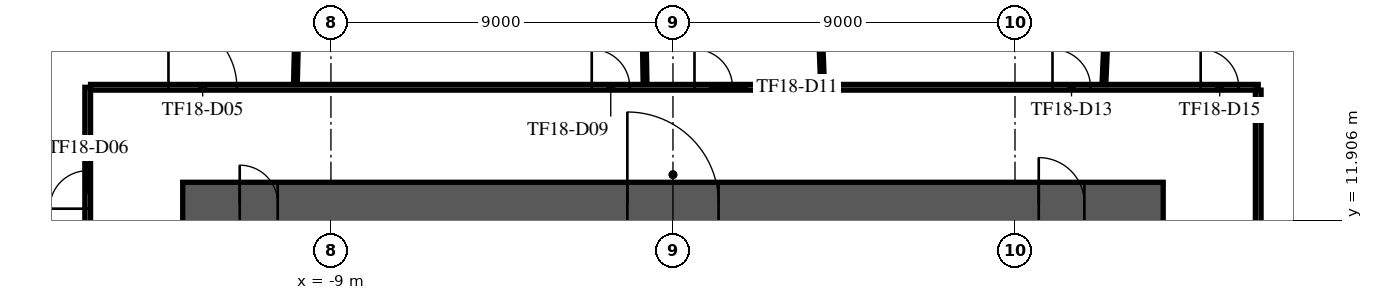
"""IFC4 building model, lengths in metres.
Left out: names, types, materials, properties, quantities, classifications, styles, units other than length and angle.
Written with IfcOpenShell. Run it as: python <this file> out.ifc"""

import sys

from ifc_helpers import new_model, si_unit, direction, frame, frame_2d, origin, place, context, subcontext, project, spatial, rectangle, extrude, element, fill, save


model = new_model("IFC4")
c1 = context("Model", 3, precision=1e-05, world=origin(), true_north=direction((0.0, 1.0)))
c2 = subcontext(c1, "Body", "Model", "MODEL_VIEW")
j1 = project(units=[si_unit("LENGTHUNIT", "METRE"), si_unit("PLANEANGLEUNIT", "RADIAN")], contexts=[c1])
p1 = place(None, origin())
s1 = spatial("IfcSite", under=j1, at=p1, CompositionType="ELEMENT")
p2 = place(p1, origin())
s2 = spatial("IfcBuilding", under=s1, at=p2, CompositionType="ELEMENT")
p3 = place(p2, frame((0.0, 0.0, 86.1)))
s3 = spatial("IfcBuildingStorey", under=s2, at=p3, CompositionType="ELEMENT", Elevation=86.1)
p4 = place(p3, frame((-12.9, 12.35, 0.0), z_axis=(0.0, 0.0, 1.0), x_axis=(1.0, 0.0, 0.0)))
e1 = element("IfcWall", 1, at=p4, inside=s3, PredefinedType="SHEAR", context=c2, shape_type="SweptSolid", body=[
    extrude(rectangle(XDim=25.8, YDim=1.1, at=frame_2d((12.9, 0.0))), origin(), (0.0, 0.0, 1.0), 3.58),
])
p5 = place(p4, frame((11.7, 0.0, 0.0)))
e2 = element("IfcOpeningElement", 2, at=p5, cuts=e1, PredefinedType="OPENING", context=c2, shape_type="SweptSolid", body=[
    extrude(rectangle(XDim=2.4, YDim=2.4, at=frame_2d((1.2, 1.2))), frame((0.0, 0.56, 0.0), z_axis=(0.0, -1.0, 0.0), x_axis=(1.0, 0.0, 0.0)), (0.0, 0.0, 1.0), 1.12),
])
p6 = place(p4, frame((22.525, 0.0, 0.0)))
e3 = element("IfcOpeningElement", 3, at=p6, cuts=e1, PredefinedType="OPENING", context=c2, shape_type="SweptSolid", body=[
    extrude(rectangle(XDim=1.2, YDim=2.1, at=frame_2d((0.6, 1.05))), frame((0.0, 0.56, 0.0), z_axis=(0.0, -1.0, 0.0), x_axis=(1.0, 0.0, 0.0)), (0.0, 0.0, 1.0), 1.12),
])
p7 = place(p4, frame((1.5, 0.0, 0.0)))
e4 = element("IfcOpeningElement", 4, at=p7, cuts=e1, PredefinedType="OPENING", context=c2, shape_type="SweptSolid", body=[
    extrude(rectangle(XDim=1.0, YDim=2.1, at=frame_2d((0.5, 1.05))), frame((0.0, 0.56, 0.0), z_axis=(0.0, -1.0, 0.0), x_axis=(1.0, 0.0, 0.0)), (0.0, 0.0, 1.0), 1.12),
])
p8 = place(p3, frame((-15.4, -15.4, 0.0), z_axis=(0.0, 0.0, 1.0), x_axis=(0.0, 1.0, 0.0)))
e5 = element("IfcWall", 5, at=p8, inside=s3, PredefinedType="PARTITIONING", context=c2, shape_type="SweptSolid", body=[
    extrude(rectangle(XDim=30.8, YDim=0.15, at=frame_2d((15.4, 0.0))), origin(), (0.0, 0.0, 1.0), 3.08),
])
p9 = place(p8, frame((21.677, 0.0, 0.0)))
e6 = element("IfcOpeningElement", 6, at=p9, cuts=e5, PredefinedType="OPENING", context=c2, shape_type="SweptSolid", body=[
    extrude(rectangle(XDim=1.8, YDim=2.1, at=frame_2d((0.9, 1.05))), frame((0.0, 0.085, 0.0), z_axis=(0.0, -1.0, 0.0), x_axis=(1.0, 0.0, 0.0)), (0.0, 0.0, 1.0), 0.17),
])
p10 = place(p8, frame((17.927, 0.0, 0.0)))
e7 = element("IfcOpeningElement", 7, at=p10, cuts=e5, PredefinedType="OPENING", context=c2, shape_type="SweptSolid", body=[
    extrude(rectangle(XDim=1.0, YDim=2.1, at=frame_2d((0.5, 1.05))), frame((0.0, 0.085, 0.0), z_axis=(0.0, -1.0, 0.0), x_axis=(1.0, 0.0, 0.0)), (0.0, 0.0, 1.0), 0.17),
])
p11 = place(p8, frame((15.322, 0.0, 0.0)))
e8 = element("IfcOpeningElement", 8, at=p11, cuts=e5, PredefinedType="OPENING", context=c2, shape_type="SweptSolid", body=[
    extrude(rectangle(XDim=1.0, YDim=2.1, at=frame_2d((0.5, 1.05))), frame((0.0, 0.085, 0.0), z_axis=(0.0, -1.0, 0.0), x_axis=(1.0, 0.0, 0.0)), (0.0, 0.0, 1.0), 0.17),
])
p12 = place(p8, frame((6.348, 0.0, 0.0)))
e9 = element("IfcOpeningElement", 9, at=p12, cuts=e5, PredefinedType="OPENING", context=c2, shape_type="SweptSolid", body=[
    extrude(rectangle(XDim=1.0, YDim=2.1, at=frame_2d((0.5, 1.05))), frame((0.0, 0.085, 0.0), z_axis=(0.0, -1.0, 0.0), x_axis=(1.0, 0.0, 0.0)), (0.0, 0.0, 1.0), 0.17),
])
p13 = place(p8, frame((27.605, 0.0, 0.0)))
e10 = element("IfcOpeningElement", 10, at=p13, cuts=e5, PredefinedType="OPENING", context=c2, shape_type="SweptSolid", body=[
    extrude(rectangle(XDim=1.0, YDim=2.1, at=frame_2d((0.5, 1.05))), frame((0.0, 0.085, 0.0), z_axis=(0.0, -1.0, 0.0), x_axis=(1.0, 0.0, 0.0)), (0.0, 0.0, 1.0), 0.17),
])
p14 = place(p8, frame((2.8, 0.0, 0.0)))
e11 = element("IfcOpeningElement", 11, at=p14, cuts=e5, PredefinedType="OPENING", context=c2, shape_type="SweptSolid", body=[
    extrude(rectangle(XDim=1.0, YDim=2.1, at=frame_2d((0.5, 1.05))), frame((0.0, 0.085, 0.0), z_axis=(0.0, -1.0, 0.0), x_axis=(1.0, 0.0, 0.0)), (0.0, 0.0, 1.0), 0.17),
])
p15 = place(p3, frame((-15.325, 15.4, 0.0), z_axis=(0.0, 0.0, 1.0), x_axis=(1.0, 0.0, 0.0)))
e12 = element("IfcWall", 12, at=p15, inside=s3, PredefinedType="PARTITIONING", context=c2, shape_type="SweptSolid", body=[
    extrude(rectangle(XDim=30.725, YDim=0.15, at=frame_2d((15.362, 0.0))), origin(), (0.0, 0.0, 1.0), 3.08),
])
p16 = place(p15, frame((2.05, 0.0, 0.0)))
e13 = element("IfcOpeningElement", 13, at=p16, cuts=e12, PredefinedType="OPENING", context=c2, shape_type="SweptSolid", body=[
    extrude(rectangle(XDim=1.8, YDim=2.1, at=frame_2d((0.9, 1.05))), frame((0.0, 0.085, 0.0), z_axis=(0.0, -1.0, 0.0), x_axis=(1.0, 0.0, 0.0)), (0.0, 0.0, 1.0), 0.17),
])
p17 = place(p15, frame((13.188, 0.0, 0.0)))
e14 = element("IfcOpeningElement", 14, at=p17, cuts=e12, PredefinedType="OPENING", context=c2, shape_type="SweptSolid", body=[
    extrude(rectangle(XDim=1.0, YDim=2.1, at=frame_2d((0.5, 1.05))), frame((0.0, 0.085, 0.0), z_axis=(0.0, -1.0, 0.0), x_axis=(1.0, 0.0, 0.0)), (0.0, 0.0, 1.0), 0.17),
])
p18 = place(p15, frame((15.892, 0.0, 0.0)))
e15 = element("IfcOpeningElement", 15, at=p18, cuts=e12, PredefinedType="OPENING", context=c2, shape_type="SweptSolid", body=[
    extrude(rectangle(XDim=1.0, YDim=2.1, at=frame_2d((0.5, 1.05))), frame((0.0, 0.085, 0.0), z_axis=(0.0, -1.0, 0.0), x_axis=(1.0, 0.0, 0.0)), (0.0, 0.0, 1.0), 0.17),
])
p19 = place(p15, frame((25.312, 0.0, 0.0)))
e16 = element("IfcOpeningElement", 16, at=p19, cuts=e12, PredefinedType="OPENING", context=c2, shape_type="SweptSolid", body=[
    extrude(rectangle(XDim=1.0, YDim=2.1, at=frame_2d((0.5, 1.05))), frame((0.0, 0.085, 0.0), z_axis=(0.0, -1.0, 0.0), x_axis=(1.0, 0.0, 0.0)), (0.0, 0.0, 1.0), 0.17),
])
p20 = place(p15, frame((29.211, 0.0, 0.0)))
e17 = element("IfcOpeningElement", 17, at=p20, cuts=e12, PredefinedType="OPENING", context=c2, shape_type="SweptSolid", body=[
    extrude(rectangle(XDim=1.0, YDim=2.1, at=frame_2d((0.5, 1.05))), frame((0.0, 0.085, 0.0), z_axis=(0.0, -1.0, 0.0), x_axis=(1.0, 0.0, 0.0)), (0.0, 0.0, 1.0), 0.17),
])
p21 = place(p3, frame((15.4, -15.325, 0.0), z_axis=(0.0, 0.0, 1.0), x_axis=(0.0, 1.0, 0.0)))
e18 = element("IfcWall", 18, at=p21, inside=s3, PredefinedType="PARTITIONING", context=c2, shape_type="SweptSolid", body=[
    extrude(rectangle(XDim=30.65, YDim=0.15, at=frame_2d((15.325, 0.0))), origin(), (0.0, 0.0, 1.0), 3.08),
])
p22 = place(p21, frame((24.14, 0.0, 0.0)))
e19 = element("IfcOpeningElement", 19, at=p22, cuts=e18, PredefinedType="OPENING", context=c2, shape_type="SweptSolid", body=[
    extrude(rectangle(XDim=1.8, YDim=2.1, at=frame_2d((0.9, 1.05))), frame((0.0, 0.085, 0.0), z_axis=(0.0, -1.0, 0.0), x_axis=(1.0, 0.0, 0.0)), (0.0, 0.0, 1.0), 0.17),
])
p23 = place(p21, frame((3.3, 0.0, 0.0)))
e20 = element("IfcOpeningElement", 20, at=p23, cuts=e18, PredefinedType="OPENING", context=c2, shape_type="SweptSolid", body=[
    extrude(rectangle(XDim=1.8, YDim=2.1, at=frame_2d((0.9, 1.05))), frame((0.0, 0.085, 0.0), z_axis=(0.0, -1.0, 0.0), x_axis=(1.0, 0.0, 0.0)), (0.0, 0.0, 1.0), 0.17),
])
p24 = place(p21, frame((19.191, 0.0, 0.0)))
e21 = element("IfcOpeningElement", 21, at=p24, cuts=e18, PredefinedType="OPENING", context=c2, shape_type="SweptSolid", body=[
    extrude(rectangle(XDim=1.0, YDim=2.1, at=frame_2d((0.5, 1.05))), frame((0.0, 0.085, 0.0), z_axis=(0.0, -1.0, 0.0), x_axis=(1.0, 0.0, 0.0)), (0.0, 0.0, 1.0), 0.17),
])
p25 = place(p21, frame((10.963, 0.0, 0.0)))
e22 = element("IfcOpeningElement", 22, at=p25, cuts=e18, PredefinedType="OPENING", context=c2, shape_type="SweptSolid", body=[
    extrude(rectangle(XDim=1.0, YDim=2.1, at=frame_2d((0.5, 1.05))), frame((0.0, 0.085, 0.0), z_axis=(0.0, -1.0, 0.0), x_axis=(1.0, 0.0, 0.0)), (0.0, 0.0, 1.0), 0.17),
])
p26 = place(p3, frame((-9.935, 15.476, 0.0), z_axis=(0.0, 0.0, 1.0), x_axis=(0.024996463825, 0.999687539582, 0.0)))
e23 = element("IfcWall", 23, at=p26, inside=s3, PredefinedType="PARTITIONING", context=c2, shape_type="SweptSolid", body=[
    extrude(rectangle(XDim=8.566, YDim=0.1, at=frame_2d((4.283, 0.0))), origin(), (0.0, 0.0, 1.0), 3.58),
])
p27 = place(p3, frame((-0.958, 28.108, 0.0), z_axis=(0.0, 0.0, 1.0), x_axis=(0.017700788333, -0.999843328773, 0.0)))
e24 = element("IfcWall", 24, at=p27, inside=s3, PredefinedType="PARTITIONING", context=c2, shape_type="SweptSolid", body=[
    extrude(rectangle(XDim=12.634, YDim=0.1, at=frame_2d((6.317, 0.0))), origin(), (0.0, 0.0, 1.0), 3.58),
])
p28 = place(p3, frame((3.448, 28.089, 0.0), z_axis=(0.0, 0.0, 1.0), x_axis=(0.038608436219, -0.999254416379, 0.0)))
e25 = element("IfcWall", 25, at=p28, inside=s3, PredefinedType="PARTITIONING", context=c2, shape_type="SweptSolid", body=[
    extrude(rectangle(XDim=12.622, YDim=0.1, at=frame_2d((6.311, 0.0))), origin(), (0.0, 0.0, 1.0), 2.96),
])
p29 = place(p3, frame((11.339, 15.477, 0.0), z_axis=(0.0, 0.0, 1.0), x_axis=(0.04370366829, 0.999044538235, 0.0)))
e26 = element("IfcWall", 26, at=p29, inside=s3, PredefinedType="PARTITIONING", context=c2, shape_type="SweptSolid", body=[
    extrude(rectangle(XDim=11.452, YDim=0.1, at=frame_2d((5.726, 0.0))), origin(), (0.0, 0.0, 1.0), 3.58),
])
p30 = place(p5, origin())
e27 = element("IfcDoor", 27, at=p30, inside=s3, OperationType="SINGLE_SWING_LEFT", PredefinedType="DOOR", context=c2, shape_type="SweptSolid", body=[
    extrude(rectangle(XDim=2.4, YDim=2.4, at=frame_2d((1.2, 1.2))), frame((0.0, 0.025, 0.0), z_axis=(0.0, -1.0, 0.0), x_axis=(1.0, 0.0, 0.0)), (0.0, 0.0, 1.0), 0.05),
])
fill(e2, e27)
p31 = place(p6, origin())
e28 = element("IfcDoor", 28, at=p31, inside=s3, OperationType="SINGLE_SWING_LEFT", PredefinedType="DOOR", context=c2, shape_type="SweptSolid", body=[
    extrude(rectangle(XDim=1.2, YDim=2.1, at=frame_2d((0.6, 1.05))), frame((0.0, 0.025, 0.0), z_axis=(0.0, -1.0, 0.0), x_axis=(1.0, 0.0, 0.0)), (0.0, 0.0, 1.0), 0.05),
])
fill(e3, e28)
p32 = place(p7, origin())
e29 = element("IfcDoor", 29, at=p32, inside=s3, OperationType="SINGLE_SWING_LEFT", PredefinedType="DOOR", context=c2, shape_type="SweptSolid", body=[
    extrude(rectangle(XDim=1.0, YDim=2.1, at=frame_2d((0.5, 1.05))), frame((0.0, 0.025, 0.0), z_axis=(0.0, -1.0, 0.0), x_axis=(1.0, 0.0, 0.0)), (0.0, 0.0, 1.0), 0.05),
])
fill(e4, e29)
p33 = place(p16, origin())
e30 = element("IfcDoor", 30, at=p33, inside=s3, OperationType="DOUBLE_DOOR_SINGLE_SWING", PredefinedType="DOOR", context=c2, shape_type="SweptSolid", body=[
    extrude(rectangle(XDim=1.8, YDim=2.1, at=frame_2d((0.9, 1.05))), frame((0.0, 0.025, 0.0), z_axis=(0.0, -1.0, 0.0), x_axis=(1.0, 0.0, 0.0)), (0.0, 0.0, 1.0), 0.05),
])
fill(e13, e30)
p34 = place(p13, origin())
e31 = element("IfcDoor", 31, at=p34, inside=s3, OperationType="SINGLE_SWING_RIGHT", PredefinedType="DOOR", context=c2, shape_type="SweptSolid", body=[
    extrude(rectangle(XDim=1.0, YDim=2.1, at=frame_2d((0.5, 1.05))), frame((0.0, 0.025, 0.0), z_axis=(0.0, -1.0, 0.0), x_axis=(1.0, 0.0, 0.0)), (0.0, 0.0, 1.0), 0.05),
])
fill(e10, e31)
p35 = place(p17, origin())
e32 = element("IfcDoor", 32, at=p35, inside=s3, OperationType="SINGLE_SWING_RIGHT", PredefinedType="DOOR", context=c2, shape_type="SweptSolid", body=[
    extrude(rectangle(XDim=1.0, YDim=2.1, at=frame_2d((0.5, 1.05))), frame((0.0, 0.025, 0.0), z_axis=(0.0, -1.0, 0.0), x_axis=(1.0, 0.0, 0.0)), (0.0, 0.0, 1.0), 0.05),
])
fill(e14, e32)
p36 = place(p18, origin())
e33 = element("IfcDoor", 33, at=p36, inside=s3, OperationType="SINGLE_SWING_LEFT", PredefinedType="DOOR", context=c2, shape_type="SweptSolid", body=[
    extrude(rectangle(XDim=1.0, YDim=2.1, at=frame_2d((0.5, 1.05))), frame((0.0, 0.025, 0.0), z_axis=(0.0, -1.0, 0.0), x_axis=(1.0, 0.0, 0.0)), (0.0, 0.0, 1.0), 0.05),
])
fill(e15, e33)
p37 = place(p19, origin())
e34 = element("IfcDoor", 34, at=p37, inside=s3, OperationType="SINGLE_SWING_RIGHT", PredefinedType="DOOR", context=c2, shape_type="SweptSolid", body=[
    extrude(rectangle(XDim=1.0, YDim=2.1, at=frame_2d((0.5, 1.05))), frame((0.0, 0.025, 0.0), z_axis=(0.0, -1.0, 0.0), x_axis=(1.0, 0.0, 0.0)), (0.0, 0.0, 1.0), 0.05),
])
fill(e16, e34)
p38 = place(p20, origin())
e35 = element("IfcDoor", 35, at=p38, inside=s3, OperationType="SINGLE_SWING_LEFT", PredefinedType="DOOR", context=c2, shape_type="SweptSolid", body=[
    extrude(rectangle(XDim=1.0, YDim=2.1, at=frame_2d((0.5, 1.05))), frame((0.0, 0.025, 0.0), z_axis=(0.0, -1.0, 0.0), x_axis=(1.0, 0.0, 0.0)), (0.0, 0.0, 1.0), 0.05),
])
fill(e17, e35)
save(model, sys.argv[1])
